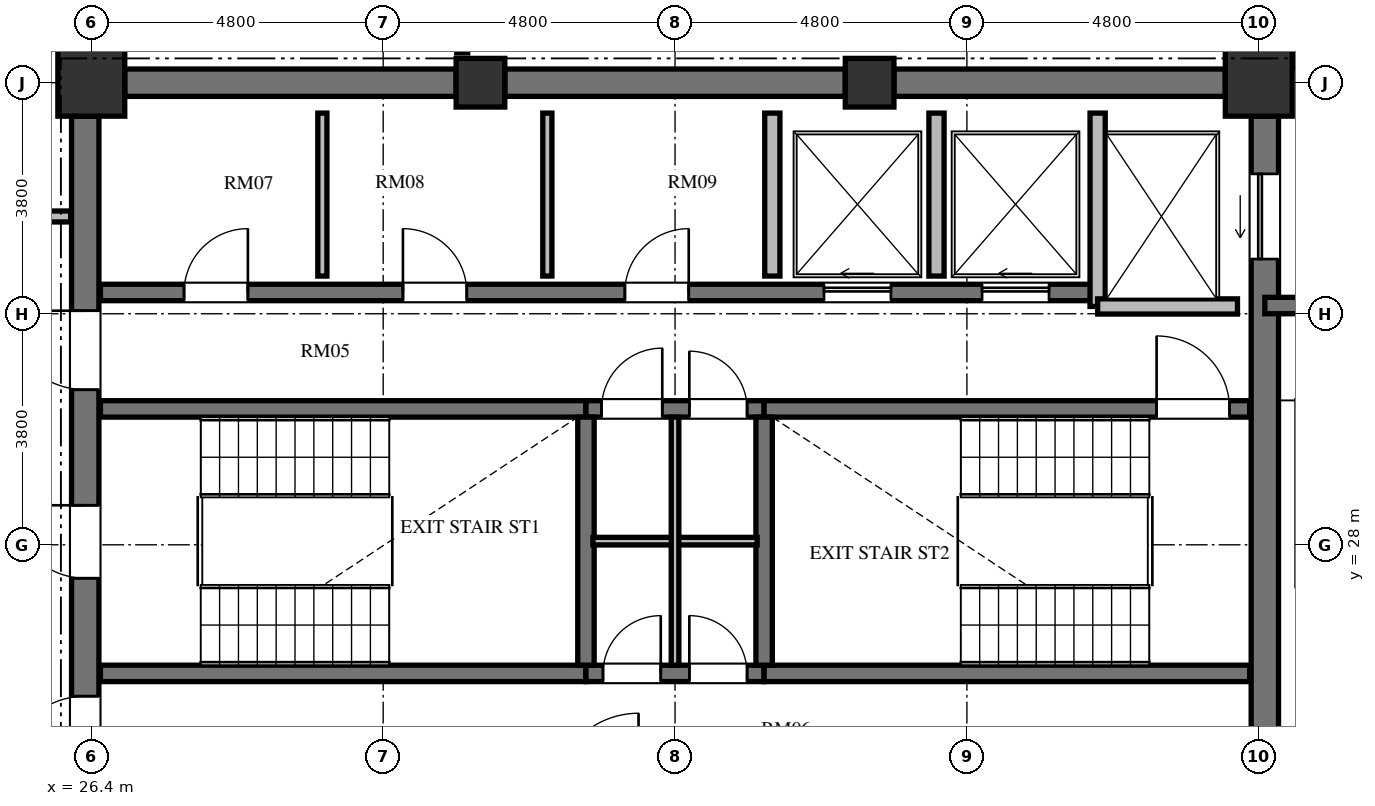
"""IFC4 building model, lengths in metres.
Left out: names, types, materials, properties, quantities, classifications, styles, units other than length and angle.
Written with IfcOpenShell. Run it as: python <this file> out.ifc"""

import sys

from ifc_helpers import new_model, si_unit, direction, frame, frame_2d, origin, origin_2d, place, context, subcontext, project, spatial, rectangle, extrude, element, fill, save


model = new_model("IFC4")
c1 = context("Model", 3, precision=1e-05, world=origin(), true_north=direction((0.0, 1.0)))
c2 = subcontext(c1, "Body", "Model", "MODEL_VIEW")
j1 = project(units=[si_unit("LENGTHUNIT", "METRE"), si_unit("PLANEANGLEUNIT", "RADIAN")], contexts=[c1])
p1 = place(None, origin())
s1 = spatial("IfcSite", under=j1, at=p1, CompositionType="ELEMENT")
p2 = place(p1, origin())
s2 = spatial("IfcBuilding", under=s1, at=p2, CompositionType="ELEMENT")
p3 = place(p2, frame((0.0, 0.0, 284.208)))
s3 = spatial("IfcBuildingStorey", under=s2, at=p3, CompositionType="ELEMENT", Elevation=284.208)
p4 = place(p3, frame((45.6, 35.6, 0.0), z_axis=(0.0, 0.0, 1.0), x_axis=(1.0, 0.0, 0.0)))
e1 = element("IfcColumn", 1, at=p4, inside=s3, PredefinedType="COLUMN", context=c2, shape_type="SweptSolid", body=[
    extrude(rectangle(XDim=1.1, YDim=1.1, at=origin_2d()), origin(), (0.0, 0.0, 1.0), 3.648),
])
for number, where, z_axis, x_axis in (
    (2, (39.2, 35.6, 0.0), (0.0, 0.0, 1.0), (1.0, 0.0, 0.0)),
    (3, (32.8, 35.6, 0.0), (0.0, 0.0, 1.0), (1.0, 0.0, 0.0)),
):
    element("IfcColumn", number, at=place(p3, frame(where, z_axis=z_axis, x_axis=x_axis)), inside=s3, PredefinedType="COLUMN", context=c2, shape_type="SweptSolid", body=[
        extrude(rectangle(XDim=0.8, YDim=0.8, at=origin_2d()), origin(), (0.0, 0.0, 1.0), 3.648),
    ])
p5 = place(p3, frame((26.4, 35.6, 0.0), z_axis=(0.0, 0.0, 1.0), x_axis=(1.0, 0.0, 0.0)))
e4 = element("IfcColumn", 4, at=p5, inside=s3, PredefinedType="COLUMN", context=c2, shape_type="SweptSolid", body=[
    extrude(rectangle(XDim=1.1, YDim=1.1, at=origin_2d()), origin(), (0.0, 0.0, 1.0), 3.648),
])
p6 = place(p3, frame((26.3, 20.95, 0.0), z_axis=(0.0, 0.0, 1.0), x_axis=(0.0, 1.0, 0.0)))
e5 = element("IfcWall", 5, at=p6, inside=s3, PredefinedType="SHEAR", context=c2, shape_type="SweptSolid", body=[
    extrude(rectangle(XDim=14.1, YDim=0.45, at=frame_2d((7.05, 0.0))), origin(), (0.0, 0.0, 1.0), 3.648),
])
p7 = place(p6, frame((6.5, 0.0, 0.0)))
e6 = element("IfcOpeningElement", 6, at=p7, cuts=e5, PredefinedType="OPENING", context=c2, shape_type="SweptSolid", body=[
    extrude(rectangle(XDim=1.2, YDim=2.15, at=frame_2d((0.6, 1.075))), frame((0.0, 0.235, 0.0), z_axis=(0.0, -1.0, 0.0), x_axis=(1.0, 0.0, 0.0)), (0.0, 0.0, 1.0), 0.47),
])
p8 = place(p6, frame((9.6, 0.0, 0.0)))
e7 = element("IfcOpeningElement", 7, at=p8, cuts=e5, PredefinedType="OPENING", context=c2, shape_type="SweptSolid", body=[
    extrude(rectangle(XDim=1.3, YDim=2.2, at=frame_2d((0.65, 1.1))), frame((0.0, 0.235, 0.0), z_axis=(0.0, -1.0, 0.0), x_axis=(1.0, 0.0, 0.0)), (0.0, 0.0, 1.0), 0.47),
])
p9 = place(p6, frame((3.26, 0.0, 0.0)))
e8 = element("IfcOpeningElement", 8, at=p9, cuts=e5, PredefinedType="OPENING", context=c2, shape_type="SweptSolid", body=[
    extrude(rectangle(XDim=1.3, YDim=2.2, at=frame_2d((0.65, 1.1))), frame((0.0, 0.235, 0.0), z_axis=(0.0, -1.0, 0.0), x_axis=(1.0, 0.0, 0.0)), (0.0, 0.0, 1.0), 0.47),
])
p10 = place(p3, frame((45.7, 20.95, 0.0), z_axis=(0.0, 0.0, 1.0), x_axis=(0.0, 1.0, 0.0)))
e9 = element("IfcWall", 9, at=p10, inside=s3, PredefinedType="SHEAR", context=c2, shape_type="SweptSolid", body=[
    extrude(rectangle(XDim=14.1, YDim=0.45, at=frame_2d((7.05, 0.0))), origin(), (0.0, 0.0, 1.0), 3.648),
])
p11 = place(p10, frame((11.75, 0.0, 0.0)))
e10 = element("IfcOpeningElement", 10, at=p11, cuts=e9, PredefinedType="OPENING", context=c2, shape_type="SweptSolid", body=[
    extrude(rectangle(XDim=1.4, YDim=2.3, at=frame_2d((0.7, 1.15))), frame((0.0, 0.235, 0.0), z_axis=(0.0, -1.0, 0.0), x_axis=(1.0, 0.0, 0.0)), (0.0, 0.0, 1.0), 0.47),
])
p12 = place(p10, frame((0.95, 0.0, 0.0)))
e11 = element("IfcOpeningElement", 11, at=p12, cuts=e9, PredefinedType="OPENING", context=c2, shape_type="SweptSolid", body=[
    extrude(rectangle(XDim=1.4, YDim=2.3, at=frame_2d((0.7, 1.15))), frame((0.0, 0.235, 0.0), z_axis=(0.0, -1.0, 0.0), x_axis=(1.0, 0.0, 0.0)), (0.0, 0.0, 1.0), 0.47),
])
p13 = place(p3, frame((26.95, 35.6, 0.0), z_axis=(0.0, 0.0, 1.0), x_axis=(1.0, 0.0, 0.0)))
e12 = element("IfcWall", 12, at=p13, inside=s3, PredefinedType="SHEAR", context=c2, shape_type="SweptSolid", body=[
    extrude(rectangle(XDim=5.45, YDim=0.45, at=frame_2d((2.725, 0.0))), origin(), (0.0, 0.0, 1.0), 3.648),
])
p14 = place(p3, frame((33.2, 35.6, 0.0), z_axis=(0.0, 0.0, 1.0), x_axis=(1.0, 0.0, 0.0)))
e13 = element("IfcWall", 13, at=p14, inside=s3, PredefinedType="SHEAR", context=c2, shape_type="SweptSolid", body=[
    extrude(rectangle(XDim=5.6, YDim=0.45, at=frame_2d((2.8, 0.0))), origin(), (0.0, 0.0, 1.0), 3.648),
])
p15 = place(p3, frame((39.6, 35.6, 0.0), z_axis=(0.0, 0.0, 1.0), x_axis=(1.0, 0.0, 0.0)))
e14 = element("IfcWall", 14, at=p15, inside=s3, PredefinedType="SHEAR", context=c2, shape_type="SweptSolid", body=[
    extrude(rectangle(XDim=5.45, YDim=0.45, at=frame_2d((2.725, 0.0))), origin(), (0.0, 0.0, 1.0), 3.648),
])
p16 = place(p3, frame((27.595, 38.808, 0.0), z_axis=(0.0, 0.0, 1.0), x_axis=(-0.728251519923, -0.685309947199, 0.0)))
e15 = element("IfcWall", 15, at=p16, inside=s3, PredefinedType="SOLIDWALL", context=c2, shape_type="SweptSolid", body=[
    extrude(rectangle(XDim=5.981, YDim=0.28, at=frame_2d((2.99, 0.0))), origin(), (0.0, 0.0, 1.0), 3.448),
])
p17 = place(p16, frame((2.391, 0.0, 0.85)))
e16 = element("IfcOpeningElement", 16, at=p17, cuts=e15, PredefinedType="OPENING", context=c2, shape_type="SweptSolid", body=[
    extrude(rectangle(XDim=1.2, YDim=1.8, at=frame_2d((0.6, 0.9))), frame((0.0, 0.15, 0.0), z_axis=(0.0, -1.0, 0.0), x_axis=(1.0, 0.0, 0.0)), (0.0, 0.0, 1.0), 0.3),
])
p18 = place(p3, frame((26.55, 30.235, 0.0), z_axis=(0.0, 0.0, 1.0), x_axis=(1.0, 0.0, 0.0)))
e17 = element("IfcWall", 17, at=p18, inside=s3, PredefinedType="SHEAR", context=c2, shape_type="SweptSolid", body=[
    extrude(rectangle(XDim=7.985, YDim=0.27, at=frame_2d((3.992, 0.0))), origin(), (0.0, 0.0, 1.0), 3.648),
])
p19 = place(p3, frame((34.535, 30.235, 0.0), z_axis=(0.0, 0.0, 1.0), x_axis=(1.0, 0.0, 0.0)))
e18 = element("IfcWall", 18, at=p19, inside=s3, PredefinedType="SHEAR", context=c2, shape_type="SweptSolid", body=[
    extrude(rectangle(XDim=2.93, YDim=0.27, at=frame_2d((1.465, 0.0))), origin(), (0.0, 0.0, 1.0), 3.648),
])
p20 = place(p19, frame((0.255, 0.0, 0.0)))
e19 = element("IfcOpeningElement", 19, at=p20, cuts=e18, PredefinedType="OPENING", context=c2, shape_type="SweptSolid", body=[
    extrude(rectangle(XDim=1.0, YDim=2.1, at=frame_2d((0.5, 1.05))), frame((0.0, 0.145, 0.0), z_axis=(0.0, -1.0, 0.0), x_axis=(1.0, 0.0, 0.0)), (0.0, 0.0, 1.0), 0.29),
])
p21 = place(p19, frame((1.7, 0.0, 0.0)))
e20 = element("IfcOpeningElement", 20, at=p21, cuts=e18, PredefinedType="OPENING", context=c2, shape_type="SweptSolid", body=[
    extrude(rectangle(XDim=0.95, YDim=2.1, at=frame_2d((0.475, 1.05))), frame((0.0, 0.145, 0.0), z_axis=(0.0, -1.0, 0.0), x_axis=(1.0, 0.0, 0.0)), (0.0, 0.0, 1.0), 0.29),
])
p22 = place(p3, frame((37.465, 30.235, 0.0), z_axis=(0.0, 0.0, 1.0), x_axis=(1.0, 0.0, 0.0)))
e21 = element("IfcWall", 21, at=p22, inside=s3, PredefinedType="SHEAR", context=c2, shape_type="SweptSolid", body=[
    extrude(rectangle(XDim=7.985, YDim=0.27, at=frame_2d((3.992, 0.0))), origin(), (0.0, 0.0, 1.0), 3.648),
])
p23 = place(p22, frame((6.455, 0.0, 0.0)))
e22 = element("IfcOpeningElement", 22, at=p23, cuts=e21, PredefinedType="OPENING", context=c2, shape_type="SweptSolid", body=[
    extrude(rectangle(XDim=1.2, YDim=2.15, at=frame_2d((0.6, 1.075))), frame((0.0, 0.145, 0.0), z_axis=(0.0, -1.0, 0.0), x_axis=(1.0, 0.0, 0.0)), (0.0, 0.0, 1.0), 0.29),
])
p24 = place(p3, frame((26.55, 25.885, 0.0), z_axis=(0.0, 0.0, 1.0), x_axis=(1.0, 0.0, 0.0)))
e23 = element("IfcWall", 23, at=p24, inside=s3, PredefinedType="SHEAR", context=c2, shape_type="SweptSolid", body=[
    extrude(rectangle(XDim=7.985, YDim=0.27, at=frame_2d((3.992, 0.0))), origin(), (0.0, 0.0, 1.0), 3.648),
])
p25 = place(p3, frame((34.535, 25.885, 0.0), z_axis=(0.0, 0.0, 1.0), x_axis=(1.0, 0.0, 0.0)))
e24 = element("IfcWall", 24, at=p25, inside=s3, PredefinedType="SHEAR", context=c2, shape_type="SweptSolid", body=[
    extrude(rectangle(XDim=2.93, YDim=0.27, at=frame_2d((1.465, 0.0))), origin(), (0.0, 0.0, 1.0), 3.648),
])
p26 = place(p25, frame((0.28, 0.0, 0.0)))
e25 = element("IfcOpeningElement", 25, at=p26, cuts=e24, PredefinedType="OPENING", context=c2, shape_type="SweptSolid", body=[
    extrude(rectangle(XDim=0.95, YDim=2.1, at=frame_2d((0.475, 1.05))), frame((0.0, 0.145, 0.0), z_axis=(0.0, -1.0, 0.0), x_axis=(1.0, 0.0, 0.0)), (0.0, 0.0, 1.0), 0.29),
])
p27 = place(p25, frame((1.7, 0.0, 0.0)))
e26 = element("IfcOpeningElement", 26, at=p27, cuts=e24, PredefinedType="OPENING", context=c2, shape_type="SweptSolid", body=[
    extrude(rectangle(XDim=0.95, YDim=2.1, at=frame_2d((0.475, 1.05))), frame((0.0, 0.145, 0.0), z_axis=(0.0, -1.0, 0.0), x_axis=(1.0, 0.0, 0.0)), (0.0, 0.0, 1.0), 0.29),
])
p28 = place(p3, frame((37.465, 25.885, 0.0), z_axis=(0.0, 0.0, 1.0), x_axis=(1.0, 0.0, 0.0)))
e27 = element("IfcWall", 27, at=p28, inside=s3, PredefinedType="SHEAR", context=c2, shape_type="SweptSolid", body=[
    extrude(rectangle(XDim=7.985, YDim=0.27, at=frame_2d((3.992, 0.0))), origin(), (0.0, 0.0, 1.0), 3.648),
])
for number, where, z_axis, x_axis in (
    (28, (34.535, 26.02, 0.0), (0.0, 0.0, 1.0), (0.0, 1.0, 0.0)),
    (29, (37.465, 26.02, 0.0), (0.0, 0.0, 1.0), (0.0, 1.0, 0.0)),
):
    element("IfcWall", number, at=place(p3, frame(where, z_axis=z_axis, x_axis=x_axis)), inside=s3, PredefinedType="SHEAR", context=c2, shape_type="SweptSolid", body=[
        extrude(rectangle(XDim=4.08, YDim=0.27, at=frame_2d((2.04, 0.0))), origin(), (0.0, 0.0, 1.0), 3.648),
    ])
p29 = place(p3, frame((34.65, 28.06, 0.0), z_axis=(0.0, 0.0, 1.0), x_axis=(1.0, 0.0, 0.0)))
e30 = element("IfcWall", 30, at=p29, inside=s3, PredefinedType="PARTITIONING", context=c2, shape_type="SweptSolid", body=[
    extrude(rectangle(XDim=2.7, YDim=0.125, at=frame_2d((1.35, 0.0))), origin(), (0.0, 0.0, 1.0), 3.448),
])
p30 = place(p3, frame((36.0, 26.02, 0.0), z_axis=(0.0, 0.0, 1.0), x_axis=(0.0, 1.0, 0.0)))
e31 = element("IfcWall", 31, at=p30, inside=s3, PredefinedType="PARTITIONING", context=c2, shape_type="SweptSolid", body=[
    extrude(rectangle(XDim=4.08, YDim=0.125, at=frame_2d((2.04, 0.0))), origin(), (0.0, 0.0, 1.0), 3.448),
])
p31 = place(p3, frame((26.55, 32.15, 0.0), z_axis=(0.0, 0.0, 1.0), x_axis=(1.0, 0.0, 0.0)))
e32 = element("IfcWall", 32, at=p31, inside=s3, PredefinedType="SHEAR", context=c2, shape_type="SweptSolid", body=[
    extrude(rectangle(XDim=16.4, YDim=0.27, at=frame_2d((8.2, 0.0))), origin(), (0.0, 0.0, 1.0), 3.648),
])
p32 = place(p31, frame((1.375, 0.0, 0.0)))
e33 = element("IfcOpeningElement", 33, at=p32, cuts=e32, PredefinedType="OPENING", context=c2, shape_type="SweptSolid", body=[
    extrude(rectangle(XDim=1.05, YDim=2.15, at=frame_2d((0.525, 1.075))), frame((0.0, 0.145, 0.0), z_axis=(0.0, -1.0, 0.0), x_axis=(1.0, 0.0, 0.0)), (0.0, 0.0, 1.0), 0.29),
])
p33 = place(p31, frame((4.975, 0.0, 0.0)))
e34 = element("IfcOpeningElement", 34, at=p33, cuts=e32, PredefinedType="OPENING", context=c2, shape_type="SweptSolid", body=[
    extrude(rectangle(XDim=1.05, YDim=2.15, at=frame_2d((0.525, 1.075))), frame((0.0, 0.145, 0.0), z_axis=(0.0, -1.0, 0.0), x_axis=(1.0, 0.0, 0.0)), (0.0, 0.0, 1.0), 0.29),
])
p34 = place(p31, frame((8.625, 0.0, 0.0)))
e35 = element("IfcOpeningElement", 35, at=p34, cuts=e32, PredefinedType="OPENING", context=c2, shape_type="SweptSolid", body=[
    extrude(rectangle(XDim=1.05, YDim=2.15, at=frame_2d((0.525, 1.075))), frame((0.0, 0.145, 0.0), z_axis=(0.0, -1.0, 0.0), x_axis=(1.0, 0.0, 0.0)), (0.0, 0.0, 1.0), 0.29),
])
p35 = place(p31, frame((11.9, 0.0, 0.0)))
e36 = element("IfcOpeningElement", 36, at=p35, cuts=e32, PredefinedType="OPENING", context=c2, shape_type="SweptSolid", body=[
    extrude(rectangle(XDim=1.1, YDim=2.2, at=frame_2d((0.55, 1.1))), frame((0.0, 0.145, 0.0), z_axis=(0.0, -1.0, 0.0), x_axis=(1.0, 0.0, 0.0)), (0.0, 0.0, 1.0), 0.29),
])
p36 = place(p31, frame((14.5, 0.0, 0.0)))
e37 = element("IfcOpeningElement", 37, at=p36, cuts=e32, PredefinedType="OPENING", context=c2, shape_type="SweptSolid", body=[
    extrude(rectangle(XDim=1.1, YDim=2.2, at=frame_2d((0.55, 1.1))), frame((0.0, 0.145, 0.0), z_axis=(0.0, -1.0, 0.0), x_axis=(1.0, 0.0, 0.0)), (0.0, 0.0, 1.0), 0.29),
])
p37 = place(p3, frame((42.95, 31.92, 0.0), z_axis=(0.0, 0.0, 1.0), x_axis=(0.0, 1.0, 0.0)))
e38 = element("IfcWall", 38, at=p37, inside=s3, PredefinedType="SOLIDWALL", context=c2, shape_type="SweptSolid", body=[
    extrude(rectangle(XDim=3.18, YDim=0.25, at=frame_2d((1.59, 0.0))), origin(), (0.0, 0.0, 1.0), 3.448),
])
p38 = place(p3, frame((42.95, 31.92, 0.0), z_axis=(0.0, 0.0, 1.0), x_axis=(1.0, 0.0, 0.0)))
e39 = element("IfcWall", 39, at=p38, inside=s3, PredefinedType="SOLIDWALL", context=c2, shape_type="SweptSolid", body=[
    extrude(rectangle(XDim=2.3, YDim=0.25, at=frame_2d((1.15, 0.0))), origin(), (0.0, 0.0, 1.0), 3.448),
])
for number, where, z_axis, x_axis in (
    (40, (37.6, 32.42, 0.0), (0.0, 0.0, 1.0), (0.0, 1.0, 0.0)),
    (41, (40.3, 32.42, 0.0), (0.0, 0.0, 1.0), (0.0, 1.0, 0.0)),
):
    element("IfcWall", number, at=place(p3, frame(where, z_axis=z_axis, x_axis=x_axis)), inside=s3, PredefinedType="SOLIDWALL", context=c2, shape_type="SweptSolid", body=[
        extrude(rectangle(XDim=2.68, YDim=0.25, at=frame_2d((1.34, 0.0))), origin(), (0.0, 0.0, 1.0), 3.448),
    ])
for number, where, z_axis, x_axis in (
    (42, (30.2, 32.42, 0.0), (0.0, 0.0, 1.0), (0.0, 1.0, 0.0)),
    (43, (33.9, 32.42, 0.0), (0.0, 0.0, 1.0), (0.0, 1.0, 0.0)),
):
    element("IfcWall", number, at=place(p3, frame(where, z_axis=z_axis, x_axis=x_axis)), inside=s3, PredefinedType="PARTITIONING", context=c2, shape_type="SweptSolid", body=[
        extrude(rectangle(XDim=2.68, YDim=0.15, at=frame_2d((1.34, 0.0))), origin(), (0.0, 0.0, 1.0), 3.448),
    ])
p39 = place(p3, frame((45.925, 35.98, 0.0), z_axis=(0.0, 0.0, 1.0), x_axis=(1.0, 0.0, 0.0)))
e44 = element("IfcWall", 44, at=p39, inside=s3, PredefinedType="SHEAR", context=c2, shape_type="SweptSolid", body=[
    extrude(rectangle(XDim=4.625, YDim=0.27, at=frame_2d((2.312, 0.0))), origin(), (0.0, 0.0, 1.0), 3.648),
])
p40 = place(p3, frame((45.7, 31.935, 0.0), z_axis=(0.0, 0.0, 1.0), x_axis=(1.0, 0.0, 0.0)))
e45 = element("IfcWall", 45, at=p40, inside=s3, PredefinedType="SHEAR", context=c2, shape_type="SweptSolid", body=[
    extrude(rectangle(XDim=4.715, YDim=0.27, at=frame_2d((2.357, 0.0))), origin(), (0.0, 0.0, 1.0), 3.648),
])
p41 = place(p3, frame((32.5, 36.09, 0.0), z_axis=(0.0, 0.0, 1.0), x_axis=(0.0, 1.0, 0.0)))
e46 = element("IfcWall", 46, at=p41, inside=s3, PredefinedType="PARTITIONING", context=c2, shape_type="SweptSolid", body=[
    extrude(rectangle(XDim=2.35, YDim=0.18, at=frame_2d((1.175, 0.0))), origin(), (0.0, 0.0, 1.0), 3.448),
])
p42 = place(p3, frame((23.71, 33.4, 0.0), z_axis=(0.0, 0.0, 1.0), x_axis=(1.0, 0.0, 0.0)))
e47 = element("IfcWall", 47, at=p42, inside=s3, PredefinedType="PARTITIONING", context=c2, shape_type="SweptSolid", body=[
    extrude(rectangle(XDim=2.35, YDim=0.18, at=frame_2d((1.175, 0.0))), origin(), (0.0, 0.0, 1.0), 3.448),
])
p43 = place(p7, origin())
e48 = element("IfcDoor", 48, at=p43, inside=s3, OperationType="SINGLE_SWING_RIGHT", PredefinedType="DOOR", context=c2, shape_type="SweptSolid", body=[
    extrude(rectangle(XDim=1.2, YDim=2.15, at=frame_2d((0.6, 1.075))), frame((0.0, 0.025, 0.0), z_axis=(0.0, -1.0, 0.0), x_axis=(1.0, 0.0, 0.0)), (0.0, 0.0, 1.0), 0.05),
])
fill(e6, e48)
p44 = place(p23, origin())
e49 = element("IfcDoor", 49, at=p44, inside=s3, OperationType="SINGLE_SWING_LEFT", PredefinedType="DOOR", context=c2, shape_type="SweptSolid", body=[
    extrude(rectangle(XDim=1.2, YDim=2.15, at=frame_2d((0.6, 1.075))), frame((0.0, 0.025, 0.0), z_axis=(0.0, -1.0, 0.0), x_axis=(1.0, 0.0, 0.0)), (0.0, 0.0, 1.0), 0.05),
])
fill(e22, e49)
p45 = place(p26, origin())
e50 = element("IfcDoor", 50, at=p45, inside=s3, OperationType="SINGLE_SWING_RIGHT", PredefinedType="DOOR", context=c2, shape_type="SweptSolid", body=[
    extrude(rectangle(XDim=0.95, YDim=2.1, at=frame_2d((0.475, 1.05))), frame((0.0, 0.025, 0.0), z_axis=(0.0, -1.0, 0.0), x_axis=(1.0, 0.0, 0.0)), (0.0, 0.0, 1.0), 0.05),
])
fill(e25, e50)
p46 = place(p27, origin())
e51 = element("IfcDoor", 51, at=p46, inside=s3, OperationType="SINGLE_SWING_LEFT", PredefinedType="DOOR", context=c2, shape_type="SweptSolid", body=[
    extrude(rectangle(XDim=0.95, YDim=2.1, at=frame_2d((0.475, 1.05))), frame((0.0, 0.025, 0.0), z_axis=(0.0, -1.0, 0.0), x_axis=(1.0, 0.0, 0.0)), (0.0, 0.0, 1.0), 0.05),
])
fill(e26, e51)
p47 = place(p20, origin())
e52 = element("IfcDoor", 52, at=p47, inside=s3, OperationType="SINGLE_SWING_RIGHT", PredefinedType="DOOR", context=c2, shape_type="SweptSolid", body=[
    extrude(rectangle(XDim=1.0, YDim=2.1, at=frame_2d((0.5, 1.05))), frame((0.0, 0.025, 0.0), z_axis=(0.0, -1.0, 0.0), x_axis=(1.0, 0.0, 0.0)), (0.0, 0.0, 1.0), 0.05),
])
fill(e19, e52)
p48 = place(p21, origin())
e53 = element("IfcDoor", 53, at=p48, inside=s3, OperationType="SINGLE_SWING_LEFT", PredefinedType="DOOR", context=c2, shape_type="SweptSolid", body=[
    extrude(rectangle(XDim=0.95, YDim=2.1, at=frame_2d((0.475, 1.05))), frame((0.0, 0.025, 0.0), z_axis=(0.0, -1.0, 0.0), x_axis=(1.0, 0.0, 0.0)), (0.0, 0.0, 1.0), 0.05),
])
fill(e20, e53)
p49 = place(p8, origin())
e54 = element("IfcDoor", 54, at=p49, inside=s3, OperationType="SINGLE_SWING_RIGHT", PredefinedType="DOOR", context=c2, shape_type="SweptSolid", body=[
    extrude(rectangle(XDim=1.3, YDim=2.2, at=frame_2d((0.65, 1.1))), frame((0.0, 0.025, 0.0), z_axis=(0.0, -1.0, 0.0), x_axis=(1.0, 0.0, 0.0)), (0.0, 0.0, 1.0), 0.05),
])
fill(e7, e54)
p50 = place(p9, origin())
e55 = element("IfcDoor", 55, at=p50, inside=s3, OperationType="SINGLE_SWING_LEFT", PredefinedType="DOOR", context=c2, shape_type="SweptSolid", body=[
    extrude(rectangle(XDim=1.3, YDim=2.2, at=frame_2d((0.65, 1.1))), frame((0.0, 0.025, 0.0), z_axis=(0.0, -1.0, 0.0), x_axis=(1.0, 0.0, 0.0)), (0.0, 0.0, 1.0), 0.05),
])
fill(e8, e55)
p51 = place(p32, origin())
e56 = element("IfcDoor", 56, at=p51, inside=s3, OperationType="SINGLE_SWING_RIGHT", PredefinedType="DOOR", context=c2, shape_type="SweptSolid", body=[
    extrude(rectangle(XDim=1.05, YDim=2.15, at=frame_2d((0.525, 1.075))), frame((0.0, 0.025, 0.0), z_axis=(0.0, -1.0, 0.0), x_axis=(1.0, 0.0, 0.0)), (0.0, 0.0, 1.0), 0.05),
])
fill(e33, e56)
p52 = place(p33, origin())
e57 = element("IfcDoor", 57, at=p52, inside=s3, OperationType="SINGLE_SWING_LEFT", PredefinedType="DOOR", context=c2, shape_type="SweptSolid", body=[
    extrude(rectangle(XDim=1.05, YDim=2.15, at=frame_2d((0.525, 1.075))), frame((0.0, 0.025, 0.0), z_axis=(0.0, -1.0, 0.0), x_axis=(1.0, 0.0, 0.0)), (0.0, 0.0, 1.0), 0.05),
])
fill(e34, e57)
p53 = place(p34, origin())
e58 = element("IfcDoor", 58, at=p53, inside=s3, OperationType="SINGLE_SWING_RIGHT", PredefinedType="DOOR", context=c2, shape_type="SweptSolid", body=[
    extrude(rectangle(XDim=1.05, YDim=2.15, at=frame_2d((0.525, 1.075))), frame((0.0, 0.025, 0.0), z_axis=(0.0, -1.0, 0.0), x_axis=(1.0, 0.0, 0.0)), (0.0, 0.0, 1.0), 0.05),
])
fill(e35, e58)
p54 = place(p35, origin())
e59 = element("IfcDoor", 59, at=p54, inside=s3, OperationType="SLIDING_TO_LEFT", PredefinedType="DOOR", context=c2, shape_type="SweptSolid", body=[
    extrude(rectangle(XDim=1.1, YDim=2.2, at=frame_2d((0.55, 1.1))), frame((0.0, 0.025, 0.0), z_axis=(0.0, -1.0, 0.0), x_axis=(1.0, 0.0, 0.0)), (0.0, 0.0, 1.0), 0.05),
])
fill(e36, e59)
p55 = place(p36, origin())
e60 = element("IfcDoor", 60, at=p55, inside=s3, OperationType="SLIDING_TO_LEFT", PredefinedType="DOOR", context=c2, shape_type="SweptSolid", body=[
    extrude(rectangle(XDim=1.1, YDim=2.2, at=frame_2d((0.55, 1.1))), frame((0.0, 0.025, 0.0), z_axis=(0.0, -1.0, 0.0), x_axis=(1.0, 0.0, 0.0)), (0.0, 0.0, 1.0), 0.05),
])
fill(e37, e60)
p56 = place(p11, origin())
e61 = element("IfcDoor", 61, at=p56, inside=s3, OperationType="SLIDING_TO_LEFT", PredefinedType="DOOR", context=c2, shape_type="SweptSolid", body=[
    extrude(rectangle(XDim=1.4, YDim=2.3, at=frame_2d((0.7, 1.15))), frame((0.0, 0.025, 0.0), z_axis=(0.0, -1.0, 0.0), x_axis=(1.0, 0.0, 0.0)), (0.0, 0.0, 1.0), 0.05),
])
fill(e10, e61)
save(model, sys.argv[1])
